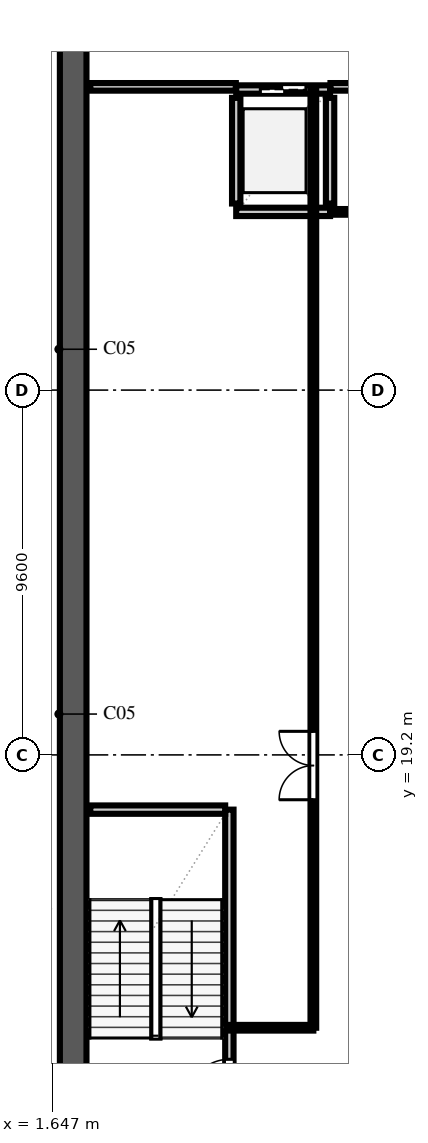
"""IFC4 building model, lengths in metres.
Left out: names, types, materials, properties, quantities, classifications, styles, units other than length and angle.
Written with IfcOpenShell. Run it as: python <this file> out.ifc"""

import sys

from ifc_helpers import new_model, si_unit, direction, frame, frame_2d, origin, place, context, subcontext, project, spatial, rectangle, extrude, element, fill, save


model = new_model("IFC4")
c1 = context("Model", 3, precision=1e-05, world=origin(), true_north=direction((0.0, 1.0)))
c2 = subcontext(c1, "Body", "Model", "MODEL_VIEW")
j1 = project(units=[si_unit("LENGTHUNIT", "METRE"), si_unit("PLANEANGLEUNIT", "RADIAN")], contexts=[c1])
p1 = place(None, origin())
s1 = spatial("IfcSite", under=j1, at=p1, CompositionType="ELEMENT")
p2 = place(p1, origin())
s2 = spatial("IfcBuilding", under=s1, at=p2, CompositionType="ELEMENT")
p3 = place(p2, frame((0.0, 0.0, 194.0)))
s3 = spatial("IfcBuildingStorey", under=s2, at=p3, CompositionType="ELEMENT", Elevation=194.0)
p4 = place(p3, frame((2.2, 9.25, 0.0), z_axis=(0.0, 0.0, 1.0), x_axis=(0.0, 1.0, 0.0)))
e1 = element("IfcWall", 1, at=p4, inside=s3, PredefinedType="SHEAR", context=c2, shape_type="SweptSolid", body=[
    extrude(rectangle(XDim=39.1, YDim=0.7, at=frame_2d((19.55, 0.0))), origin(), (0.0, 0.0, 1.0), 4.74),
])
p5 = place(p3, frame((6.31, 9.95, 0.0), z_axis=(0.0, 0.0, 1.0), x_axis=(0.0, 1.0, 0.0)))
e2 = element("IfcWall", 2, at=p5, inside=s3, PredefinedType="SOLIDWALL", context=c2, shape_type="SweptSolid", body=[
    extrude(rectangle(XDim=7.81, YDim=0.22, at=frame_2d((3.905, 0.0))), origin(), (0.0, 0.0, 1.0), 4.74),
])
p6 = place(p5, frame((0.14, 0.0, 0.0)))
e3 = element("IfcOpeningElement", 3, at=p6, cuts=e2, PredefinedType="OPENING", context=c2, shape_type="SweptSolid", body=[
    extrude(rectangle(XDim=1.1, YDim=2.2, at=frame_2d((0.55, 1.1))), frame((0.0, 0.122, 0.0), z_axis=(0.0, -1.0, 0.0), x_axis=(1.0, 0.0, 0.0)), (0.0, 0.0, 1.0), 0.244),
])
p7 = place(p3, frame((2.65, 17.76, 0.0), z_axis=(0.0, 0.0, 1.0), x_axis=(1.0, 0.0, 0.0)))
e4 = element("IfcWall", 4, at=p7, inside=s3, PredefinedType="SOLIDWALL", context=c2, shape_type="SweptSolid", body=[
    extrude(rectangle(XDim=3.55, YDim=0.22, at=frame_2d((1.775, 0.0))), origin(), (0.0, 0.0, 1.0), 4.74),
])
for number, where, z_axis, x_axis in (
    (5, (6.49, 33.71, 0.0), (0.0, 0.0, 1.0), (0.0, 1.0, 0.0)),
    (6, (8.96, 33.71, 0.0), (0.0, 0.0, 1.0), (0.0, 1.0, 0.0)),
):
    element("IfcWall", number, at=place(p3, frame(where, z_axis=z_axis, x_axis=x_axis)), inside=s3, PredefinedType="SOLIDWALL", context=c2, shape_type="SweptSolid", body=[
        extrude(rectangle(XDim=2.78, YDim=0.22, at=frame_2d((1.39, 0.0))), origin(), (0.0, 0.0, 1.0), 4.74),
    ])
p8 = place(p3, frame((6.49, 33.49, 0.0), z_axis=(0.0, 0.0, 1.0), x_axis=(1.0, 0.0, 0.0)))
e7 = element("IfcWall", 7, at=p8, inside=s3, PredefinedType="SOLIDWALL", context=c2, shape_type="SweptSolid", body=[
    extrude(rectangle(XDim=2.47, YDim=0.22, at=frame_2d((1.235, 0.0))), origin(), (0.0, 0.0, 1.0), 4.74),
])
p9 = place(p3, frame((6.49, 36.71, 0.0), z_axis=(0.0, 0.0, 1.0), x_axis=(1.0, 0.0, 0.0)))
e8 = element("IfcWall", 8, at=p9, inside=s3, PredefinedType="SOLIDWALL", context=c2, shape_type="SweptSolid", body=[
    extrude(rectangle(XDim=2.47, YDim=0.22, at=frame_2d((1.235, 0.0))), origin(), (0.0, 0.0, 1.0), 4.74),
])
p10 = place(p9, frame((0.635, 0.0, 0.0)))
e9 = element("IfcOpeningElement", 9, at=p10, cuts=e8, PredefinedType="OPENING", context=c2, shape_type="SweptSolid", body=[
    extrude(rectangle(XDim=1.2, YDim=2.2, at=frame_2d((0.6, 1.1))), frame((0.0, 0.122, 0.0), z_axis=(0.0, -1.0, 0.0), x_axis=(1.0, 0.0, 0.0)), (0.0, 0.0, 1.0), 0.244),
])
p11 = place(p3, frame((2.65, 36.78, 0.0), z_axis=(0.0, 0.0, 1.0), x_axis=(1.0, 0.0, 0.0)))
e10 = element("IfcWall", 10, at=p11, inside=s3, PredefinedType="SOLIDWALL", context=c2, shape_type="SweptSolid", body=[
    extrude(rectangle(XDim=3.83, YDim=0.2, at=frame_2d((1.915, 0.0))), origin(), (0.0, 0.0, 1.0), 4.74),
])
p12 = place(p3, frame((8.97, 36.78, 0.0), z_axis=(0.0, 0.0, 1.0), x_axis=(1.0, 0.0, 0.0)))
e11 = element("IfcWall", 11, at=p12, inside=s3, PredefinedType="SOLIDWALL", context=c2, shape_type="SweptSolid", body=[
    extrude(rectangle(XDim=1.51, YDim=0.2, at=frame_2d((0.755, 0.0))), origin(), (0.0, 0.0, 1.0), 4.74),
])
p13 = place(p3, frame((8.965, 33.49, 0.0), z_axis=(0.0, 0.0, 1.0), x_axis=(1.0, 0.0, 0.0)))
e12 = element("IfcWall", 12, at=p13, inside=s3, PredefinedType="PARTITIONING", context=c2, shape_type="SweptSolid", body=[
    extrude(rectangle(XDim=1.52, YDim=0.15, at=frame_2d((0.76, 0.0))), origin(), (0.0, 0.0, 1.0), 4.74),
])
p14 = place(p3, frame((6.32, 12.02, 0.0), z_axis=(0.0, 0.0, 1.0), x_axis=(1.0, 0.0, 0.0)))
e13 = element("IfcWall", 13, at=p14, inside=s3, PredefinedType="PARTITIONING", context=c2, shape_type="SweptSolid", body=[
    extrude(rectangle(XDim=2.2, YDim=0.15, at=frame_2d((1.1, 0.0))), origin(), (0.0, 0.0, 1.0), 4.74),
])
p15 = place(p3, frame((8.52, 12.02, 0.0), z_axis=(0.0, 0.0, 1.0), x_axis=(0.0, 1.0, 0.0)))
e14 = element("IfcWall", 14, at=p15, inside=s3, PredefinedType="PARTITIONING", context=c2, shape_type="SweptSolid", body=[
    extrude(rectangle(XDim=24.76, YDim=0.15, at=frame_2d((12.38, 0.0))), origin(), (0.0, 0.0, 1.0), 4.74),
])
p16 = place(p15, frame((6.0, 0.0, 0.0)))
e15 = element("IfcOpeningElement", 15, at=p16, cuts=e14, PredefinedType="OPENING", context=c2, shape_type="SweptSolid", body=[
    extrude(rectangle(XDim=1.8, YDim=2.2, at=frame_2d((0.9, 1.1))), frame((0.0, 0.087, 0.0), z_axis=(0.0, -1.0, 0.0), x_axis=(1.0, 0.0, 0.0)), (0.0, 0.0, 1.0), 0.174),
])
p17 = place(p6, origin())
e16 = element("IfcDoor", 16, at=p17, inside=s3, OperationType="SINGLE_SWING_LEFT", PredefinedType="DOOR", context=c2, shape_type="SweptSolid", body=[
    extrude(rectangle(XDim=1.1, YDim=2.2, at=frame_2d((0.55, 1.1))), frame((0.0, 0.025, 0.0), z_axis=(0.0, -1.0, 0.0), x_axis=(1.0, 0.0, 0.0)), (0.0, 0.0, 1.0), 0.05),
])
fill(e3, e16)
p18 = place(p10, origin())
e17 = element("IfcDoor", 17, at=p18, inside=s3, OperationType="DOUBLE_DOOR_SLIDING", PredefinedType="DOOR", context=c2, shape_type="SweptSolid", body=[
    extrude(rectangle(XDim=1.2, YDim=2.2, at=frame_2d((0.6, 1.1))), frame((0.0, 0.025, 0.0), z_axis=(0.0, -1.0, 0.0), x_axis=(1.0, 0.0, 0.0)), (0.0, 0.0, 1.0), 0.05),
])
fill(e9, e17)
p19 = place(p16, origin())
e18 = element("IfcDoor", 18, at=p19, inside=s3, OperationType="DOUBLE_DOOR_SINGLE_SWING", PredefinedType="DOOR", context=c2, shape_type="SweptSolid", body=[
    extrude(rectangle(XDim=1.8, YDim=2.2, at=frame_2d((0.9, 1.1))), frame((0.0, 0.025, 0.0), z_axis=(0.0, -1.0, 0.0), x_axis=(1.0, 0.0, 0.0)), (0.0, 0.0, 1.0), 0.05),
])
fill(e15, e18)
save(model, sys.argv[1])
